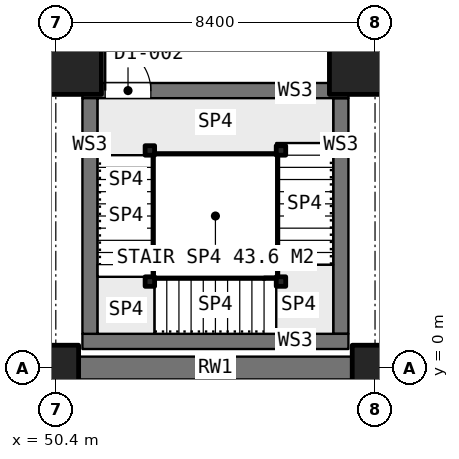
"""IFC4 building model, lengths in metres.
Left out: names, types, materials, properties, quantities, classifications, styles, units other than length and angle.
Written with IfcOpenShell. Run it as: python <this file> out.ifc"""

import sys

from ifc_helpers import new_model, si_unit, direction, frame, frame_2d, origin, origin_2d, place, context, subcontext, project, spatial, rectangle, extrude, element, fill, save


model = new_model("IFC4")
c1 = context("Model", 3, precision=1e-05, world=origin(), true_north=direction((0.0, 1.0)))
c2 = subcontext(c1, "Body", "Model", "MODEL_VIEW")
j1 = project(units=[si_unit("LENGTHUNIT", "METRE"), si_unit("PLANEANGLEUNIT", "RADIAN")], contexts=[c1])
p1 = place(None, origin())
s1 = spatial("IfcSite", under=j1, at=p1, CompositionType="ELEMENT")
p2 = place(p1, origin())
s2 = spatial("IfcBuilding", under=s1, at=p2, CompositionType="ELEMENT")
p3 = place(p2, frame((0.0, 0.0, -9.9)))
s3 = spatial("IfcBuildingStorey", under=s2, at=p3, CompositionType="ELEMENT", Elevation=-9.9)
p4 = place(p3, frame((50.4, 0.0, 0.0), z_axis=(0.0, 0.0, 1.0), x_axis=(1.0, 0.0, 0.0)))
e1 = element("IfcColumn", 1, at=p4, inside=s3, PredefinedType="COLUMN", context=c2, shape_type="SweptSolid", body=[
    extrude(rectangle(XDim=1.2, YDim=1.2, at=origin_2d()), origin(), (0.0, 0.0, 1.0), 4.5),
])
p5 = place(p3, frame((50.4, 8.4, 0.0), z_axis=(0.0, 0.0, 1.0), x_axis=(1.0, 0.0, 0.0)))
e2 = element("IfcColumn", 2, at=p5, inside=s3, PredefinedType="COLUMN", context=c2, shape_type="SweptSolid", body=[
    extrude(rectangle(XDim=2.4, YDim=2.4, at=origin_2d()), origin(), (0.0, 0.0, 1.0), 4.5),
])
p6 = place(p3, frame((58.8, 0.0, 0.0), z_axis=(0.0, 0.0, 1.0), x_axis=(1.0, 0.0, 0.0)))
e3 = element("IfcColumn", 3, at=p6, inside=s3, PredefinedType="COLUMN", context=c2, shape_type="SweptSolid", body=[
    extrude(rectangle(XDim=1.2, YDim=1.2, at=origin_2d()), origin(), (0.0, 0.0, 1.0), 4.5),
])
p7 = place(p3, frame((58.8, 8.4, 0.0), z_axis=(0.0, 0.0, 1.0), x_axis=(1.0, 0.0, 0.0)))
e4 = element("IfcColumn", 4, at=p7, inside=s3, PredefinedType="COLUMN", context=c2, shape_type="SweptSolid", body=[
    extrude(rectangle(XDim=2.4, YDim=2.4, at=origin_2d()), origin(), (0.0, 0.0, 1.0), 4.5),
])
p8 = place(p3, frame((51.0, 0.0, 0.0), z_axis=(0.0, 0.0, 1.0), x_axis=(1.0, 0.0, 0.0)))
e5 = element("IfcWall", 5, at=p8, inside=s3, PredefinedType="SOLIDWALL", context=c2, shape_type="SweptSolid", body=[
    extrude(rectangle(XDim=7.2, YDim=0.6, at=frame_2d((3.6, 0.0))), origin(), (0.0, 0.0, 1.0), 4.2),
])
p9 = place(p3, frame((51.1, 0.7, 0.0), z_axis=(0.0, 0.0, 1.0), x_axis=(1.0, 0.0, 0.0)))
e6 = element("IfcWall", 6, at=p9, inside=s3, PredefinedType="SOLIDWALL", context=c2, shape_type="SweptSolid", body=[
    extrude(rectangle(XDim=7.0, YDim=0.4, at=frame_2d((3.5, 0.0))), origin(), (0.0, 0.0, 1.0), 4.2),
])
p10 = place(p3, frame((51.1, 7.3, 0.0), z_axis=(0.0, 0.0, 1.0), x_axis=(1.0, 0.0, 0.0)))
e7 = element("IfcWall", 7, at=p10, inside=s3, PredefinedType="SOLIDWALL", context=c2, shape_type="SweptSolid", body=[
    extrude(rectangle(XDim=7.0, YDim=0.4, at=frame_2d((3.5, 0.0))), origin(), (0.0, 0.0, 1.0), 4.2),
])
p11 = place(p10, frame((0.6, 0.0, 0.0)))
e8 = element("IfcOpeningElement", 8, at=p11, cuts=e7, PredefinedType="OPENING", context=c2, shape_type="SweptSolid", body=[
    extrude(rectangle(XDim=1.2, YDim=2.1, at=frame_2d((0.6, 1.05))), frame((0.0, 0.21, 0.0), z_axis=(0.0, -1.0, 0.0), x_axis=(1.0, 0.0, 0.0)), (0.0, 0.0, 1.0), 0.42),
])
for number, where, z_axis, x_axis in (
    (9, (51.3, 0.9, 0.0), (0.0, 0.0, 1.0), (0.0, 1.0, 0.0)),
    (10, (57.9, 0.9, 0.0), (0.0, 0.0, 1.0), (0.0, 1.0, 0.0)),
):
    element("IfcWall", number, at=place(p3, frame(where, z_axis=z_axis, x_axis=x_axis)), inside=s3, PredefinedType="SOLIDWALL", context=c2, shape_type="SweptSolid", body=[
        extrude(rectangle(XDim=6.2, YDim=0.4, at=frame_2d((3.1, 0.0))), origin(), (0.0, 0.0, 1.0), 4.2),
    ])
for number, where, z_axis, x_axis in (
    (11, (52.875, 5.725, 0.0), (0.0, 0.0, 1.0), (1.0, 0.0, 0.0)),
    (12, (52.875, 2.275, 0.0), (0.0, 0.0, 1.0), (1.0, 0.0, 0.0)),
    (13, (56.325, 2.275, 0.0), (0.0, 0.0, 1.0), (1.0, 0.0, 0.0)),
    (14, (56.325, 5.725, 0.0), (0.0, 0.0, 1.0), (1.0, 0.0, 0.0)),
):
    element("IfcColumn", number, at=place(p3, frame(where, z_axis=z_axis, x_axis=x_axis)), inside=s3, PredefinedType="COLUMN", context=c2, shape_type="SweptSolid", body=[
        extrude(rectangle(XDim=0.25, YDim=0.25, at=origin_2d()), origin(), (0.0, 0.0, 1.0), 4.5),
    ])
p12 = place(p11, origin())
e15 = element("IfcDoor", 15, at=p12, inside=s3, OperationType="SINGLE_SWING_RIGHT", PredefinedType="DOOR", context=c2, shape_type="SweptSolid", body=[
    extrude(rectangle(XDim=1.2, YDim=2.1, at=frame_2d((0.6, 1.05))), frame((0.0, 0.025, 0.0), z_axis=(0.0, -1.0, 0.0), x_axis=(1.0, 0.0, 0.0)), (0.0, 0.0, 1.0), 0.05),
])
fill(e8, e15)
save(model, sys.argv[1])
